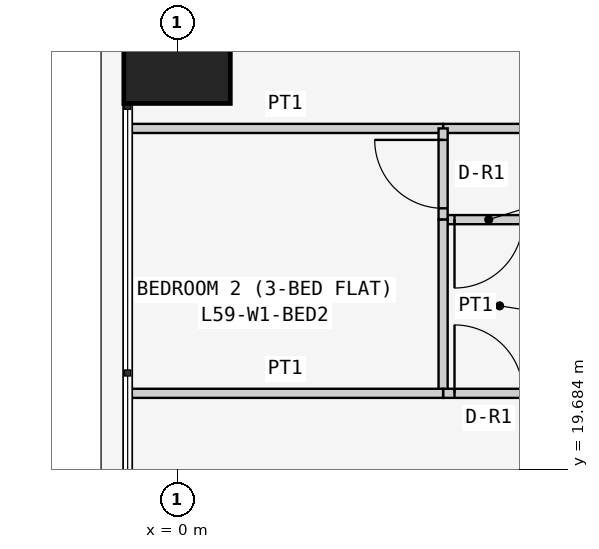
"""IFC4 building model, lengths in metres.
Left out: names, types, materials, properties, quantities, classifications, styles, units other than length and angle.
Written with IfcOpenShell. Run it as: python <this file> out.ifc"""

import sys

from ifc_helpers import new_model, si_unit, direction, frame, frame_2d, origin, origin_2d, place, context, subcontext, project, spatial, rectangle, extrude, element, fill, save


model = new_model("IFC4")
c1 = context("Model", 3, precision=1e-05, world=origin(), true_north=direction((0.0, 1.0)))
c2 = subcontext(c1, "Body", "Model", "MODEL_VIEW")
j1 = project(units=[si_unit("LENGTHUNIT", "METRE"), si_unit("PLANEANGLEUNIT", "RADIAN")], contexts=[c1])
p1 = place(None, origin())
s1 = spatial("IfcSite", under=j1, at=p1, CompositionType="ELEMENT")
p2 = place(p1, origin())
s2 = spatial("IfcBuilding", under=s1, at=p2, CompositionType="ELEMENT")
p3 = place(p2, frame((0.0, 0.0, 226.5)))
s3 = spatial("IfcBuildingStorey", under=s2, at=p3, CompositionType="ELEMENT", Elevation=226.5)
p4 = place(p3, frame((0.0, 25.2, 0.0), z_axis=(0.0, 0.0, 1.0), x_axis=(1.0, 0.0, 0.0)))
e1 = element("IfcColumn", 1, at=p4, inside=s3, PredefinedType="COLUMN", context=c2, shape_type="SweptSolid", body=[
    extrude(rectangle(XDim=1.4, YDim=1.4, at=origin_2d()), origin(), (0.0, 0.0, 1.0), 3.6),
])
p5 = place(p3, frame((3.5, 24.171, 0.0), z_axis=(0.0, 0.0, 1.0), x_axis=(1.0, 0.0, 0.0)))
e2 = element("IfcWall", 2, at=p5, inside=s3, PredefinedType="PARTITIONING", context=c2, shape_type="SweptSolid", body=[
    extrude(rectangle(XDim=2.7, YDim=0.12, at=frame_2d((1.35, 0.0))), origin(), (0.0, 0.0, 1.0), 3.45),
])
p6 = place(p5, frame((1.25, 0.0, 0.0)))
e3 = element("IfcOpeningElement", 3, at=p6, cuts=e2, PredefinedType="OPENING", context=c2, shape_type="SweptSolid", body=[
    extrude(rectangle(XDim=0.9, YDim=2.1, at=frame_2d((0.45, 1.05))), frame((0.0, 0.07, 0.0), z_axis=(0.0, -1.0, 0.0), x_axis=(1.0, 0.0, 0.0)), (0.0, 0.0, 1.0), 0.14),
])
p7 = place(p3, frame((-0.65, 24.171, 0.0), z_axis=(0.0, 0.0, 1.0), x_axis=(1.0, 0.0, 0.0)))
e4 = element("IfcWall", 4, at=p7, inside=s3, PredefinedType="PARTITIONING", context=c2, shape_type="SweptSolid", body=[
    extrude(rectangle(XDim=4.15, YDim=0.12, at=frame_2d((2.075, 0.0))), origin(), (0.0, 0.0, 1.0), 3.45),
])
p8 = place(p3, frame((3.5, 22.971, 0.0), z_axis=(0.0, 0.0, 1.0), x_axis=(1.0, 0.0, 0.0)))
e5 = element("IfcWall", 5, at=p8, inside=s3, PredefinedType="PARTITIONING", context=c2, shape_type="SweptSolid", body=[
    extrude(rectangle(XDim=1.2, YDim=0.12, at=frame_2d((0.6, 0.0))), origin(), (0.0, 0.0, 1.0), 3.45),
])
p9 = place(p8, frame((0.15, 0.0, 0.0)))
e6 = element("IfcOpeningElement", 6, at=p9, cuts=e5, PredefinedType="OPENING", context=c2, shape_type="SweptSolid", body=[
    extrude(rectangle(XDim=0.9, YDim=2.1, at=frame_2d((0.45, 1.05))), frame((0.0, 0.07, 0.0), z_axis=(0.0, -1.0, 0.0), x_axis=(1.0, 0.0, 0.0)), (0.0, 0.0, 1.0), 0.14),
])
p10 = place(p3, frame((3.5, 24.171, 0.0), z_axis=(0.0, 0.0, 1.0), x_axis=(0.0, -1.0, 0.0)))
e7 = element("IfcWall", 7, at=p10, inside=s3, PredefinedType="PARTITIONING", context=c2, shape_type="SweptSolid", body=[
    extrude(rectangle(XDim=1.2, YDim=0.12, at=frame_2d((0.6, 0.0))), origin(), (0.0, 0.0, 1.0), 3.45),
])
p11 = place(p10, frame((0.151, 0.0, 0.0)))
e8 = element("IfcOpeningElement", 8, at=p11, cuts=e7, PredefinedType="OPENING", context=c2, shape_type="SweptSolid", body=[
    extrude(rectangle(XDim=0.9, YDim=2.1, at=frame_2d((0.45, 1.05))), frame((0.0, 0.07, 0.0), z_axis=(0.0, -1.0, 0.0), x_axis=(1.0, 0.0, 0.0)), (0.0, 0.0, 1.0), 0.14),
])
p12 = place(p3, frame((3.5, 22.971, 0.0), z_axis=(0.0, 0.0, 1.0), x_axis=(0.0, -1.0, 0.0)))
e9 = element("IfcWall", 9, at=p12, inside=s3, PredefinedType="PARTITIONING", context=c2, shape_type="SweptSolid", body=[
    extrude(rectangle(XDim=2.285, YDim=0.12, at=frame_2d((1.143, 0.0))), origin(), (0.0, 0.0, 1.0), 3.45),
])
p13 = place(p3, frame((3.5, 20.686, 0.0), z_axis=(0.0, 0.0, 1.0), x_axis=(1.0, 0.0, 0.0)))
e10 = element("IfcWall", 10, at=p13, inside=s3, PredefinedType="PARTITIONING", context=c2, shape_type="SweptSolid", body=[
    extrude(rectangle(XDim=1.2, YDim=0.12, at=frame_2d((0.6, 0.0))), origin(), (0.0, 0.0, 1.0), 3.45),
])
p14 = place(p13, frame((0.15, 0.0, 0.0)))
e11 = element("IfcOpeningElement", 11, at=p14, cuts=e10, PredefinedType="OPENING", context=c2, shape_type="SweptSolid", body=[
    extrude(rectangle(XDim=0.9, YDim=2.1, at=frame_2d((0.45, 1.05))), frame((0.0, 0.07, 0.0), z_axis=(0.0, -1.0, 0.0), x_axis=(1.0, 0.0, 0.0)), (0.0, 0.0, 1.0), 0.14),
])
p15 = place(p3, frame((-0.65, 20.686, 0.0), z_axis=(0.0, 0.0, 1.0), x_axis=(1.0, 0.0, 0.0)))
e12 = element("IfcWall", 12, at=p15, inside=s3, PredefinedType="PARTITIONING", context=c2, shape_type="SweptSolid", body=[
    extrude(rectangle(XDim=4.15, YDim=0.12, at=frame_2d((2.075, 0.0))), origin(), (0.0, 0.0, 1.0), 3.45),
])
p16 = place(p9, frame((0.9, 0.0, 0.0), z_axis=(0.0, 0.0, 1.0), x_axis=(-1.0, 0.0, 0.0)))
e13 = element("IfcDoor", 13, at=p16, inside=s3, OperationType="SINGLE_SWING_RIGHT", PredefinedType="DOOR", context=c2, shape_type="SweptSolid", body=[
    extrude(rectangle(XDim=0.9, YDim=2.1, at=frame_2d((0.45, 1.05))), frame((0.0, 0.025, 0.0), z_axis=(0.0, -1.0, 0.0), x_axis=(1.0, 0.0, 0.0)), (0.0, 0.0, 1.0), 0.05),
])
fill(e6, e13)
p17 = place(p14, origin())
e14 = element("IfcDoor", 14, at=p17, inside=s3, OperationType="SINGLE_SWING_LEFT", PredefinedType="DOOR", context=c2, shape_type="SweptSolid", body=[
    extrude(rectangle(XDim=0.9, YDim=2.1, at=frame_2d((0.45, 1.05))), frame((0.0, 0.025, 0.0), z_axis=(0.0, -1.0, 0.0), x_axis=(1.0, 0.0, 0.0)), (0.0, 0.0, 1.0), 0.05),
])
fill(e11, e14)
p18 = place(p11, frame((0.9, 0.0, 0.0), z_axis=(0.0, 0.0, 1.0), x_axis=(-1.0, 0.0, 0.0)))
e15 = element("IfcDoor", 15, at=p18, inside=s3, OperationType="SINGLE_SWING_RIGHT", PredefinedType="DOOR", context=c2, shape_type="SweptSolid", body=[
    extrude(rectangle(XDim=0.9, YDim=2.1, at=frame_2d((0.45, 1.05))), frame((0.0, 0.025, 0.0), z_axis=(0.0, -1.0, 0.0), x_axis=(1.0, 0.0, 0.0)), (0.0, 0.0, 1.0), 0.05),
])
fill(e8, e15)
save(model, sys.argv[1])
